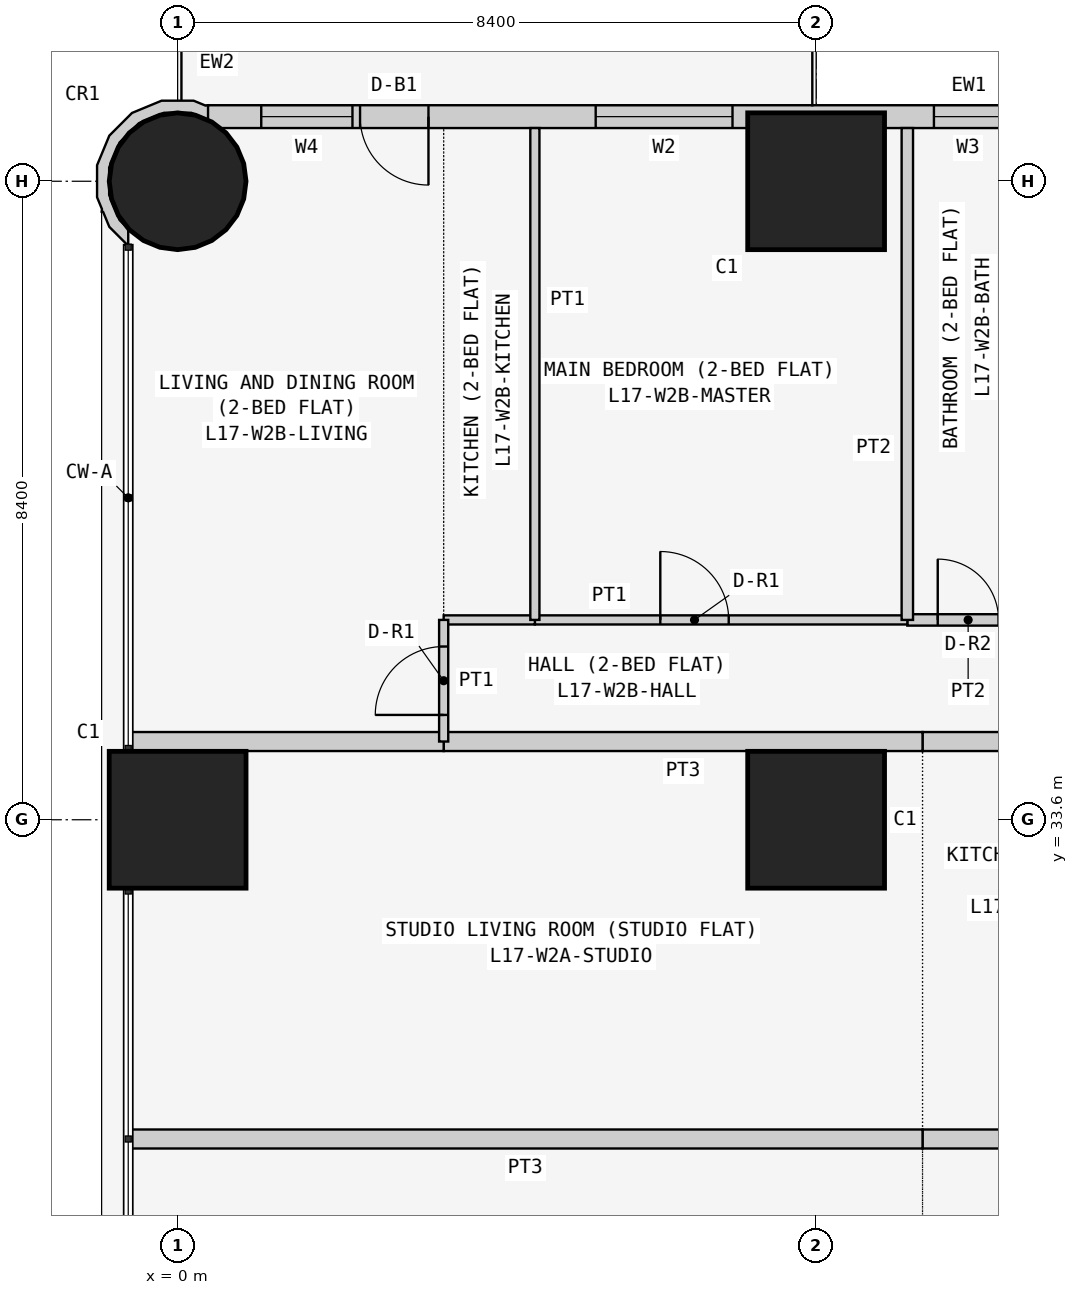
"""IFC4 building model, lengths in metres.
Left out: names, types, materials, properties, quantities, classifications, styles, units other than length and angle.
Written with IfcOpenShell. Run it as: python <this file> out.ifc"""

import sys

from ifc_helpers import new_model, si_unit, direction, frame, frame_2d, origin, origin_2d, place, context, subcontext, project, spatial, polyline, rectangle, circle, outline, extrude, element, fill, save


model = new_model("IFC4")
c1 = context("Model", 3, precision=1e-05, world=origin(), true_north=direction((0.0, 1.0)))
c2 = subcontext(c1, "Body", "Model", "MODEL_VIEW")
j1 = project(units=[si_unit("LENGTHUNIT", "METRE"), si_unit("PLANEANGLEUNIT", "RADIAN")], contexts=[c1])
p1 = place(None, origin())
s1 = spatial("IfcSite", under=j1, at=p1, CompositionType="ELEMENT")
p2 = place(p1, origin())
s2 = spatial("IfcBuilding", under=s1, at=p2, CompositionType="ELEMENT")
p3 = place(p2, frame((0.0, 0.0, 70.5)))
s3 = spatial("IfcBuildingStorey", under=s2, at=p3, CompositionType="ELEMENT", Elevation=70.5)
p4 = place(p3, frame((0.0, 33.6, 0.0), z_axis=(0.0, 0.0, 1.0), x_axis=(1.0, 0.0, 0.0)))
e1 = element("IfcColumn", 1, at=p4, inside=s3, PredefinedType="COLUMN", context=c2, shape_type="SweptSolid", body=[
    extrude(rectangle(XDim=1.8, YDim=1.8, at=origin_2d()), origin(), (0.0, 0.0, 1.0), 3.6),
])
p5 = place(p3, frame((0.0, 42.0, 0.0), z_axis=(0.0, 0.0, 1.0), x_axis=(1.0, 0.0, 0.0)))
e2 = element("IfcColumn", 2, at=p5, inside=s3, PredefinedType="COLUMN", context=c2, shape_type="SweptSolid", body=[
    extrude(circle(Radius=0.9, at=origin_2d()), origin(), (0.0, 0.0, 1.0), 3.6),
])
for number, where, z_axis, x_axis in (
    (3, (8.4, 33.6, 0.0), (0.0, 0.0, 1.0), (1.0, 0.0, 0.0)),
    (4, (8.4, 42.0, 0.0), (0.0, 0.0, 1.0), (1.0, 0.0, 0.0)),
):
    element("IfcColumn", number, at=place(p3, frame(where, z_axis=z_axis, x_axis=x_axis)), inside=s3, PredefinedType="COLUMN", context=c2, shape_type="SweptSolid", body=[
        extrude(rectangle(XDim=1.8, YDim=1.8, at=origin_2d()), origin(), (0.0, 0.0, 1.0), 3.6),
    ])
p6 = place(p3, frame((15.8, 42.85, 0.0), z_axis=(0.0, 0.0, 1.0), x_axis=(-1.0, 0.0, 0.0)))
e5 = element("IfcWall", 5, at=p6, inside=s3, PredefinedType="SOLIDWALL", context=c2, shape_type="SweptSolid", body=[
    extrude(rectangle(XDim=15.4, YDim=0.3, at=frame_2d((7.7, 0.0))), origin(), (0.0, 0.0, 1.0), 3.45),
])
p7 = place(p6, frame((1.2, 0.0, 0.9)))
e6 = element("IfcOpeningElement", 6, at=p7, cuts=e5, PredefinedType="OPENING", context=c2, shape_type="SweptSolid", body=[
    extrude(rectangle(XDim=1.8, YDim=1.5, at=frame_2d((0.9, 0.75))), frame((0.0, 0.16, 0.0), z_axis=(0.0, -1.0, 0.0), x_axis=(1.0, 0.0, 0.0)), (0.0, 0.0, 1.0), 0.32),
])
p8 = place(p6, frame((4.95, 0.0, 1.5)))
e7 = element("IfcOpeningElement", 7, at=p8, cuts=e5, PredefinedType="OPENING", context=c2, shape_type="SweptSolid", body=[
    extrude(rectangle(XDim=0.9, YDim=0.7, at=frame_2d((0.45, 0.35))), frame((0.0, 0.16, 0.0), z_axis=(0.0, -1.0, 0.0), x_axis=(1.0, 0.0, 0.0)), (0.0, 0.0, 1.0), 0.32),
])
p9 = place(p6, frame((8.5, 0.0, 0.9)))
e8 = element("IfcOpeningElement", 8, at=p9, cuts=e5, PredefinedType="OPENING", context=c2, shape_type="SweptSolid", body=[
    extrude(rectangle(XDim=1.8, YDim=1.5, at=frame_2d((0.9, 0.75))), frame((0.0, 0.16, 0.0), z_axis=(0.0, -1.0, 0.0), x_axis=(1.0, 0.0, 0.0)), (0.0, 0.0, 1.0), 0.32),
])
p10 = place(p6, frame((12.5, 0.0, 0.0)))
e9 = element("IfcOpeningElement", 9, at=p10, cuts=e5, PredefinedType="OPENING", context=c2, shape_type="SweptSolid", body=[
    extrude(rectangle(XDim=0.9, YDim=2.4, at=frame_2d((0.45, 1.2))), frame((0.0, 0.16, 0.0), z_axis=(0.0, -1.0, 0.0), x_axis=(1.0, 0.0, 0.0)), (0.0, 0.0, 1.0), 0.32),
])
p11 = place(p6, frame((13.5, 0.0, 0.9)))
e10 = element("IfcOpeningElement", 10, at=p11, cuts=e5, PredefinedType="OPENING", context=c2, shape_type="SweptSolid", body=[
    extrude(rectangle(XDim=1.2, YDim=1.5, at=frame_2d((0.6, 0.75))), frame((0.0, 0.16, 0.0), z_axis=(0.0, -1.0, 0.0), x_axis=(1.0, 0.0, 0.0)), (0.0, 0.0, 1.0), 0.32),
])
p12 = place(p3, frame((0.364, 42.91, 0.0), z_axis=(0.0, 0.0, 1.0), x_axis=(-0.926129809145, 0.377204953059, 0.0)))
e11 = element("IfcWall", 11, at=p12, inside=s3, PredefinedType="SOLIDWALL", context=c2, shape_type="SweptSolid", body=[
    extrude(outline(polyline([(0.36, 1.803), (0.509, 1.741), (0.761, 1.486), (0.896, 1.154), (0.894, 0.795), (0.755, 0.465), (0.5, 0.213), (0.168, 0.078), (-0.1, 0.08), (0.001, -0.097), (0.03, -0.08), (0.199, -0.081), (0.589, 0.078), (0.889, 0.374), (1.053, 0.763), (1.055, 1.185), (0.896, 1.575), (0.778, 1.695), (0.769, 1.728), (0.75, 1.723), (0.6, 1.875), (0.295, 2.003), (0.281, 1.998), (0.36, 1.803)])), origin(), (0.0, 0.0, 1.0), 3.45),
])
p13 = place(p3, frame((13.4, 29.4, 0.0), z_axis=(0.0, 0.0, 1.0), x_axis=(-1.0, 0.0, 0.0)))
e12 = element("IfcWall", 12, at=p13, inside=s3, PredefinedType="PARTITIONING", context=c2, shape_type="SweptSolid", body=[
    extrude(rectangle(XDim=3.6, YDim=0.25, at=frame_2d((1.8, 0.0))), origin(), (0.0, 0.0, 1.0), 3.45),
])
p14 = place(p3, frame((9.8, 29.4, 0.0), z_axis=(0.0, 0.0, 1.0), x_axis=(-1.0, 0.0, 0.0)))
e13 = element("IfcWall", 13, at=p14, inside=s3, PredefinedType="PARTITIONING", context=c2, shape_type="SweptSolid", body=[
    extrude(rectangle(XDim=10.45, YDim=0.25, at=frame_2d((5.225, 0.0))), origin(), (0.0, 0.0, 1.0), 3.45),
])
p15 = place(p3, frame((9.8, 34.629, 0.0), z_axis=(0.0, 0.0, 1.0), x_axis=(1.0, 0.0, 0.0)))
e14 = element("IfcWall", 14, at=p15, inside=s3, PredefinedType="PARTITIONING", context=c2, shape_type="SweptSolid", body=[
    extrude(rectangle(XDim=3.6, YDim=0.25, at=frame_2d((1.8, 0.0))), origin(), (0.0, 0.0, 1.0), 3.45),
])
p16 = place(p3, frame((3.5, 34.629, 0.0), z_axis=(0.0, 0.0, 1.0), x_axis=(1.0, 0.0, 0.0)))
e15 = element("IfcWall", 15, at=p16, inside=s3, PredefinedType="PARTITIONING", context=c2, shape_type="SweptSolid", body=[
    extrude(rectangle(XDim=6.3, YDim=0.25, at=frame_2d((3.15, 0.0))), origin(), (0.0, 0.0, 1.0), 3.45),
])
p17 = place(p3, frame((-0.65, 34.629, 0.0), z_axis=(0.0, 0.0, 1.0), x_axis=(1.0, 0.0, 0.0)))
e16 = element("IfcWall", 16, at=p17, inside=s3, PredefinedType="PARTITIONING", context=c2, shape_type="SweptSolid", body=[
    extrude(rectangle(XDim=4.15, YDim=0.25, at=frame_2d((2.075, 0.0))), origin(), (0.0, 0.0, 1.0), 3.45),
])
p18 = place(p3, frame((9.6, 36.229, 0.0), z_axis=(0.0, 0.0, 1.0), x_axis=(1.0, 0.0, 0.0)))
e17 = element("IfcWall", 17, at=p18, inside=s3, PredefinedType="PARTITIONING", context=c2, shape_type="SweptSolid", body=[
    extrude(rectangle(XDim=1.6, YDim=0.15, at=frame_2d((0.8, 0.0))), origin(), (0.0, 0.0, 1.0), 3.45),
])
p19 = place(p18, frame((0.4, 0.0, 0.0)))
e18 = element("IfcOpeningElement", 18, at=p19, cuts=e17, PredefinedType="OPENING", context=c2, shape_type="SweptSolid", body=[
    extrude(rectangle(XDim=0.8, YDim=2.1, at=frame_2d((0.4, 1.05))), frame((0.0, 0.085, 0.0), z_axis=(0.0, -1.0, 0.0), x_axis=(1.0, 0.0, 0.0)), (0.0, 0.0, 1.0), 0.17),
])
p20 = place(p3, frame((4.7, 36.229, 0.0), z_axis=(0.0, 0.0, 1.0), x_axis=(1.0, 0.0, 0.0)))
e19 = element("IfcWall", 19, at=p20, inside=s3, PredefinedType="PARTITIONING", context=c2, shape_type="SweptSolid", body=[
    extrude(rectangle(XDim=4.9, YDim=0.12, at=frame_2d((2.45, 0.0))), origin(), (0.0, 0.0, 1.0), 3.45),
])
p21 = place(p20, frame((1.65, 0.0, 0.0)))
e20 = element("IfcOpeningElement", 20, at=p21, cuts=e19, PredefinedType="OPENING", context=c2, shape_type="SweptSolid", body=[
    extrude(rectangle(XDim=0.9, YDim=2.1, at=frame_2d((0.45, 1.05))), frame((0.0, 0.07, 0.0), z_axis=(0.0, -1.0, 0.0), x_axis=(1.0, 0.0, 0.0)), (0.0, 0.0, 1.0), 0.14),
])
p22 = place(p3, frame((3.5, 36.229, 0.0), z_axis=(0.0, 0.0, 1.0), x_axis=(1.0, 0.0, 0.0)))
e21 = element("IfcWall", 21, at=p22, inside=s3, PredefinedType="PARTITIONING", context=c2, shape_type="SweptSolid", body=[
    extrude(rectangle(XDim=1.2, YDim=0.12, at=frame_2d((0.6, 0.0))), origin(), (0.0, 0.0, 1.0), 3.45),
])
p23 = place(p3, frame((3.5, 34.629, 0.0), z_axis=(0.0, 0.0, 1.0), x_axis=(0.0, 1.0, 0.0)))
e22 = element("IfcWall", 22, at=p23, inside=s3, PredefinedType="PARTITIONING", context=c2, shape_type="SweptSolid", body=[
    extrude(rectangle(XDim=1.6, YDim=0.12, at=frame_2d((0.8, 0.0))), origin(), (0.0, 0.0, 1.0), 3.45),
])
p24 = place(p23, frame((0.35, 0.0, 0.0)))
e23 = element("IfcOpeningElement", 23, at=p24, cuts=e22, PredefinedType="OPENING", context=c2, shape_type="SweptSolid", body=[
    extrude(rectangle(XDim=0.9, YDim=2.1, at=frame_2d((0.45, 1.05))), frame((0.0, 0.07, 0.0), z_axis=(0.0, -1.0, 0.0), x_axis=(1.0, 0.0, 0.0)), (0.0, 0.0, 1.0), 0.14),
])
p25 = place(p3, frame((9.6, 36.229, 0.0), z_axis=(0.0, 0.0, 1.0), x_axis=(0.0, 1.0, 0.0)))
e24 = element("IfcWall", 24, at=p25, inside=s3, PredefinedType="PARTITIONING", context=c2, shape_type="SweptSolid", body=[
    extrude(rectangle(XDim=6.471, YDim=0.15, at=frame_2d((3.235, 0.0))), origin(), (0.0, 0.0, 1.0), 3.45),
])
p26 = place(p3, frame((4.7, 36.229, 0.0), z_axis=(0.0, 0.0, 1.0), x_axis=(0.0, 1.0, 0.0)))
e25 = element("IfcWall", 25, at=p26, inside=s3, PredefinedType="PARTITIONING", context=c2, shape_type="SweptSolid", body=[
    extrude(rectangle(XDim=6.471, YDim=0.12, at=frame_2d((3.235, 0.0))), origin(), (0.0, 0.0, 1.0), 3.45),
])
p27 = place(p8, origin())
e26 = element("IfcWindow", 26, at=p27, inside=s3, PartitioningType="SINGLE_PANEL", PredefinedType="WINDOW", context=c2, shape_type="SweptSolid", body=[
    extrude(rectangle(XDim=0.9, YDim=0.7, at=frame_2d((0.45, 0.35))), frame((0.0, 0.03, 0.0), z_axis=(0.0, -1.0, 0.0), x_axis=(1.0, 0.0, 0.0)), (0.0, 0.0, 1.0), 0.06),
])
fill(e7, e26)
p28 = place(p9, origin())
e27 = element("IfcWindow", 27, at=p28, inside=s3, PartitioningType="SINGLE_PANEL", PredefinedType="WINDOW", context=c2, shape_type="SweptSolid", body=[
    extrude(rectangle(XDim=1.8, YDim=1.5, at=frame_2d((0.9, 0.75))), frame((0.0, 0.03, 0.0), z_axis=(0.0, -1.0, 0.0), x_axis=(1.0, 0.0, 0.0)), (0.0, 0.0, 1.0), 0.06),
])
fill(e8, e27)
p29 = place(p10, origin())
e28 = element("IfcDoor", 28, at=p29, inside=s3, OperationType="SINGLE_SWING_LEFT", PredefinedType="DOOR", context=c2, shape_type="SweptSolid", body=[
    extrude(rectangle(XDim=0.9, YDim=2.4, at=frame_2d((0.45, 1.2))), frame((0.0, 0.025, 0.0), z_axis=(0.0, -1.0, 0.0), x_axis=(1.0, 0.0, 0.0)), (0.0, 0.0, 1.0), 0.05),
])
fill(e9, e28)
p30 = place(p11, origin())
e29 = element("IfcWindow", 29, at=p30, inside=s3, PartitioningType="SINGLE_PANEL", PredefinedType="WINDOW", context=c2, shape_type="SweptSolid", body=[
    extrude(rectangle(XDim=1.2, YDim=1.5, at=frame_2d((0.6, 0.75))), frame((0.0, 0.03, 0.0), z_axis=(0.0, -1.0, 0.0), x_axis=(1.0, 0.0, 0.0)), (0.0, 0.0, 1.0), 0.06),
])
fill(e10, e29)
p31 = place(p19, origin())
e30 = element("IfcDoor", 30, at=p31, inside=s3, OperationType="SINGLE_SWING_LEFT", PredefinedType="DOOR", context=c2, shape_type="SweptSolid", body=[
    extrude(rectangle(XDim=0.8, YDim=2.1, at=frame_2d((0.4, 1.05))), frame((0.0, 0.025, 0.0), z_axis=(0.0, -1.0, 0.0), x_axis=(1.0, 0.0, 0.0)), (0.0, 0.0, 1.0), 0.05),
])
fill(e18, e30)
p32 = place(p21, origin())
e31 = element("IfcDoor", 31, at=p32, inside=s3, OperationType="SINGLE_SWING_LEFT", PredefinedType="DOOR", context=c2, shape_type="SweptSolid", body=[
    extrude(rectangle(XDim=0.9, YDim=2.1, at=frame_2d((0.45, 1.05))), frame((0.0, 0.025, 0.0), z_axis=(0.0, -1.0, 0.0), x_axis=(1.0, 0.0, 0.0)), (0.0, 0.0, 1.0), 0.05),
])
fill(e20, e31)
p33 = place(p24, origin())
e32 = element("IfcDoor", 32, at=p33, inside=s3, OperationType="SINGLE_SWING_LEFT", PredefinedType="DOOR", context=c2, shape_type="SweptSolid", body=[
    extrude(rectangle(XDim=0.9, YDim=2.1, at=frame_2d((0.45, 1.05))), frame((0.0, 0.025, 0.0), z_axis=(0.0, -1.0, 0.0), x_axis=(1.0, 0.0, 0.0)), (0.0, 0.0, 1.0), 0.05),
])
fill(e23, e32)
save(model, sys.argv[1])
